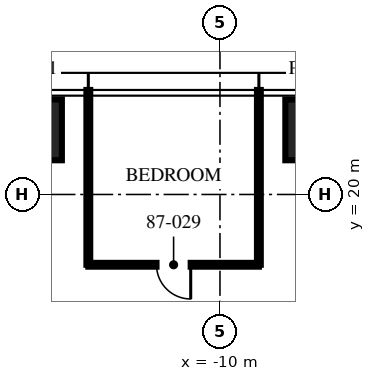
"""IFC4 building model, lengths in metres.
Left out: names, types, materials, properties, quantities, classifications, styles, units other than length and angle.
Written with IfcOpenShell. Run it as: python <this file> out.ifc"""

import sys

from ifc_helpers import new_model, si_unit, direction, frame, frame_2d, origin, origin_2d, place, context, subcontext, project, spatial, rectangle, extrude, element, fill, save


model = new_model("IFC4")
c1 = context("Model", 3, precision=1e-05, world=origin(), true_north=direction((0.0, 1.0)))
c2 = subcontext(c1, "Body", "Model", "MODEL_VIEW")
j1 = project(units=[si_unit("LENGTHUNIT", "METRE"), si_unit("PLANEANGLEUNIT", "RADIAN")], contexts=[c1])
p1 = place(None, origin())
s1 = spatial("IfcSite", under=j1, at=p1, CompositionType="ELEMENT")
p2 = place(p1, origin())
s2 = spatial("IfcBuilding", under=s1, at=p2, CompositionType="ELEMENT")
p3 = place(p2, frame((0.0, 0.0, 345.75)))
s3 = spatial("IfcBuildingStorey", under=s2, at=p3, CompositionType="ELEMENT", Elevation=345.75)
for number, where, z_axis, x_axis in (
    (1, (-14.96, 21.7, 0.0), (0.0, 0.0, 1.0), (1.0, 0.0, 0.0)),
    (2, (-7.48, 21.7, 0.0), (0.0, 0.0, 1.0), (1.0, 0.0, 0.0)),
):
    element("IfcColumn", number, at=place(p3, frame(where, z_axis=z_axis, x_axis=x_axis)), inside=s3, PredefinedType="COLUMN", context=c2, shape_type="SweptSolid", body=[
        extrude(rectangle(XDim=1.6, YDim=1.6, at=origin_2d()), origin(), (0.0, 0.0, 1.0), 3.75),
    ])
for number, where, z_axis, x_axis in (
    (3, (-8.976, 18.15, 0.0), (0.0, 0.0, 1.0), (0.0, 1.0, 0.0)),
    (4, (-13.464, 18.15, 0.0), (0.0, 0.0, 1.0), (0.0, 1.0, 0.0)),
):
    element("IfcWall", number, at=place(p3, frame(where, z_axis=z_axis, x_axis=x_axis)), inside=s3, PredefinedType="PARTITIONING", context=c2, shape_type="SweptSolid", body=[
        extrude(rectangle(XDim=4.6, YDim=0.1, at=frame_2d((2.3, 0.0))), origin(), (0.0, 0.0, 1.0), 2.91),
    ])
p4 = place(p3, frame((-8.976, 18.15, 0.0), z_axis=(0.0, 0.0, 1.0), x_axis=(-1.0, 0.0, 0.0)))
e5 = element("IfcWall", 5, at=p4, inside=s3, PredefinedType="PARTITIONING", context=c2, shape_type="SweptSolid", body=[
    extrude(rectangle(XDim=4.488, YDim=0.1, at=frame_2d((2.244, 0.0))), origin(), (0.0, 0.0, 1.0), 2.81),
])
p5 = place(p4, frame((1.794, 0.0, 0.0)))
e6 = element("IfcOpeningElement", 6, at=p5, cuts=e5, PredefinedType="OPENING", context=c2, shape_type="SweptSolid", body=[
    extrude(rectangle(XDim=0.9, YDim=2.1, at=frame_2d((0.45, 1.05))), frame((0.0, 0.06, 0.0), z_axis=(0.0, -1.0, 0.0), x_axis=(1.0, 0.0, 0.0)), (0.0, 0.0, 1.0), 0.12),
])
p6 = place(p5, origin())
e7 = element("IfcDoor", 7, at=p6, inside=s3, OperationType="SINGLE_SWING_LEFT", PredefinedType="DOOR", context=c2, shape_type="SweptSolid", body=[
    extrude(rectangle(XDim=0.9, YDim=2.1, at=frame_2d((0.45, 1.05))), frame((0.0, 0.025, 0.0), z_axis=(0.0, -1.0, 0.0), x_axis=(1.0, 0.0, 0.0)), (0.0, 0.0, 1.0), 0.05),
])
fill(e6, e7)
save(model, sys.argv[1])
